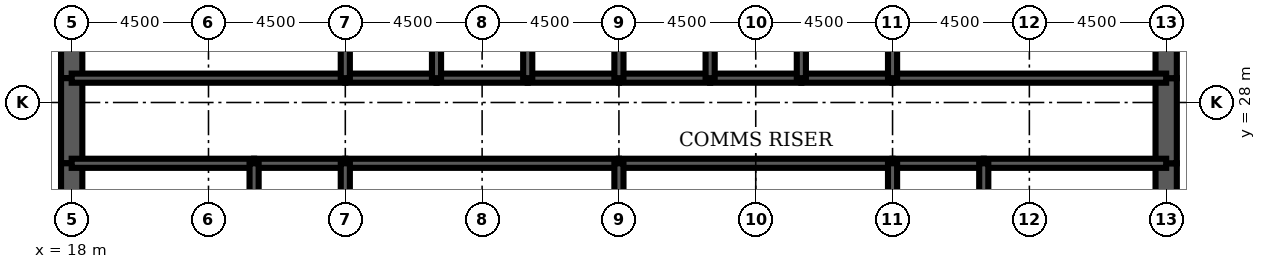
"""IFC4 building model, lengths in metres.
Left out: names, types, materials, properties, quantities, classifications, styles, units other than length and angle.
Written with IfcOpenShell. Run it as: python <this file> out.ifc"""

import sys

from ifc_helpers import new_model, si_unit, direction, frame, frame_2d, origin, place, context, subcontext, project, spatial, rectangle, extrude, element, fill, save


model = new_model("IFC4")
c1 = context("Model", 3, precision=1e-05, world=origin(), true_north=direction((0.0, 1.0)))
c2 = subcontext(c1, "Body", "Model", "MODEL_VIEW")
j1 = project(units=[si_unit("LENGTHUNIT", "METRE"), si_unit("PLANEANGLEUNIT", "RADIAN")], contexts=[c1])
p1 = place(None, origin())
s1 = spatial("IfcSite", under=j1, at=p1, CompositionType="ELEMENT")
p2 = place(p1, origin())
s2 = spatial("IfcBuilding", under=s1, at=p2, CompositionType="ELEMENT")
p3 = place(p2, frame((0.0, 0.0, 271.1)))
s3 = spatial("IfcBuildingStorey", under=s2, at=p3, CompositionType="ELEMENT", Elevation=271.1)
p4 = place(p3, frame((18.0, 32.0, 0.0), z_axis=(0.0, 0.0, 1.0), x_axis=(0.0, -1.0, 0.0)))
e1 = element("IfcWall", 1, at=p4, inside=s3, PredefinedType="SHEAR", context=c2, shape_type="SweptSolid", body=[
    extrude(rectangle(XDim=3.2, YDim=0.7, at=frame_2d((1.6, 0.0))), origin(), (0.0, 0.0, 1.0), 4.2),
])
p5 = place(p3, frame((18.0, 28.8, 0.0), z_axis=(0.0, 0.0, 1.0), x_axis=(0.0, -1.0, 0.0)))
e2 = element("IfcWall", 2, at=p5, inside=s3, PredefinedType="SHEAR", context=c2, shape_type="SweptSolid", body=[
    extrude(rectangle(XDim=2.8, YDim=0.7, at=frame_2d((1.4, 0.0))), origin(), (0.0, 0.0, 1.0), 4.2),
])
p6 = place(p5, frame((0.4, 0.0, 0.0)))
e3 = element("IfcOpeningElement", 3, at=p6, cuts=e2, PredefinedType="OPENING", context=c2, shape_type="SweptSolid", body=[
    extrude(rectangle(XDim=1.8, YDim=2.1, at=frame_2d((0.9, 1.05))), frame((0.0, 0.36, 0.0), z_axis=(0.0, -1.0, 0.0), x_axis=(1.0, 0.0, 0.0)), (0.0, 0.0, 1.0), 0.72),
])
for number, where, z_axis, x_axis in (
    (4, (18.0, 26.0, 0.0), (0.0, 0.0, 1.0), (0.0, -1.0, 0.0)),
    (5, (54.0, 22.0, 0.0), (0.0, 0.0, 1.0), (0.0, 1.0, 0.0)),
):
    element("IfcWall", number, at=place(p3, frame(where, z_axis=z_axis, x_axis=x_axis)), inside=s3, PredefinedType="SHEAR", context=c2, shape_type="SweptSolid", body=[
        extrude(rectangle(XDim=4.0, YDim=0.7, at=frame_2d((2.0, 0.0))), origin(), (0.0, 0.0, 1.0), 4.2),
    ])
p7 = place(p3, frame((54.0, 26.0, 0.0), z_axis=(0.0, 0.0, 1.0), x_axis=(0.0, 1.0, 0.0)))
e6 = element("IfcWall", 6, at=p7, inside=s3, PredefinedType="SHEAR", context=c2, shape_type="SweptSolid", body=[
    extrude(rectangle(XDim=2.8, YDim=0.7, at=frame_2d((1.4, 0.0))), origin(), (0.0, 0.0, 1.0), 4.2),
])
p8 = place(p7, frame((0.6, 0.0, 0.0)))
e7 = element("IfcOpeningElement", 7, at=p8, cuts=e6, PredefinedType="OPENING", context=c2, shape_type="SweptSolid", body=[
    extrude(rectangle(XDim=1.8, YDim=2.1, at=frame_2d((0.9, 1.05))), frame((0.0, 0.36, 0.0), z_axis=(0.0, -1.0, 0.0), x_axis=(1.0, 0.0, 0.0)), (0.0, 0.0, 1.0), 0.72),
])
p9 = place(p3, frame((54.0, 28.8, 0.0), z_axis=(0.0, 0.0, 1.0), x_axis=(0.0, 1.0, 0.0)))
e8 = element("IfcWall", 8, at=p9, inside=s3, PredefinedType="SHEAR", context=c2, shape_type="SweptSolid", body=[
    extrude(rectangle(XDim=3.2, YDim=0.7, at=frame_2d((1.6, 0.0))), origin(), (0.0, 0.0, 1.0), 4.2),
])
p10 = place(p3, frame((18.0, 28.8, 0.0), z_axis=(0.0, 0.0, 1.0), x_axis=(1.0, 0.0, 0.0)))
e9 = element("IfcWall", 9, at=p10, inside=s3, PredefinedType="SOLIDWALL", context=c2, shape_type="SweptSolid", body=[
    extrude(rectangle(XDim=9.0, YDim=0.3, at=frame_2d((4.5, 0.0))), origin(), (0.0, 0.0, 1.0), 4.2),
])
p11 = place(p10, frame((0.65, 0.0, 0.0)))
e10 = element("IfcOpeningElement", 10, at=p11, cuts=e9, PredefinedType="OPENING", context=c2, shape_type="SweptSolid", body=[
    extrude(rectangle(XDim=1.0, YDim=2.1, at=frame_2d((0.5, 1.05))), frame((0.0, 0.16, 0.0), z_axis=(0.0, -1.0, 0.0), x_axis=(1.0, 0.0, 0.0)), (0.0, 0.0, 1.0), 0.32),
])
p12 = place(p3, frame((27.0, 28.8, 0.0), z_axis=(0.0, 0.0, 1.0), x_axis=(1.0, 0.0, 0.0)))
e11 = element("IfcWall", 11, at=p12, inside=s3, PredefinedType="SOLIDWALL", context=c2, shape_type="SweptSolid", body=[
    extrude(rectangle(XDim=3.0, YDim=0.3, at=frame_2d((1.5, 0.0))), origin(), (0.0, 0.0, 1.0), 4.2),
])
p13 = place(p12, frame((0.95, 0.0, 0.0)))
e12 = element("IfcOpeningElement", 12, at=p13, cuts=e11, PredefinedType="OPENING", context=c2, shape_type="SweptSolid", body=[
    extrude(rectangle(XDim=1.1, YDim=2.2, at=frame_2d((0.55, 1.1))), frame((0.0, 0.16, 0.0), z_axis=(0.0, -1.0, 0.0), x_axis=(1.0, 0.0, 0.0)), (0.0, 0.0, 1.0), 0.32),
])
p14 = place(p3, frame((30.0, 28.8, 0.0), z_axis=(0.0, 0.0, 1.0), x_axis=(1.0, 0.0, 0.0)))
e13 = element("IfcWall", 13, at=p14, inside=s3, PredefinedType="SOLIDWALL", context=c2, shape_type="SweptSolid", body=[
    extrude(rectangle(XDim=3.0, YDim=0.3, at=frame_2d((1.5, 0.0))), origin(), (0.0, 0.0, 1.0), 4.2),
])
p15 = place(p14, frame((0.95, 0.0, 0.0)))
e14 = element("IfcOpeningElement", 14, at=p15, cuts=e13, PredefinedType="OPENING", context=c2, shape_type="SweptSolid", body=[
    extrude(rectangle(XDim=1.1, YDim=2.2, at=frame_2d((0.55, 1.1))), frame((0.0, 0.16, 0.0), z_axis=(0.0, -1.0, 0.0), x_axis=(1.0, 0.0, 0.0)), (0.0, 0.0, 1.0), 0.32),
])
p16 = place(p3, frame((33.0, 28.8, 0.0), z_axis=(0.0, 0.0, 1.0), x_axis=(1.0, 0.0, 0.0)))
e15 = element("IfcWall", 15, at=p16, inside=s3, PredefinedType="SOLIDWALL", context=c2, shape_type="SweptSolid", body=[
    extrude(rectangle(XDim=3.0, YDim=0.3, at=frame_2d((1.5, 0.0))), origin(), (0.0, 0.0, 1.0), 4.2),
])
p17 = place(p16, frame((0.95, 0.0, 0.0)))
e16 = element("IfcOpeningElement", 16, at=p17, cuts=e15, PredefinedType="OPENING", context=c2, shape_type="SweptSolid", body=[
    extrude(rectangle(XDim=1.1, YDim=2.2, at=frame_2d((0.55, 1.1))), frame((0.0, 0.16, 0.0), z_axis=(0.0, -1.0, 0.0), x_axis=(1.0, 0.0, 0.0)), (0.0, 0.0, 1.0), 0.32),
])
p18 = place(p3, frame((36.0, 28.8, 0.0), z_axis=(0.0, 0.0, 1.0), x_axis=(1.0, 0.0, 0.0)))
e17 = element("IfcWall", 17, at=p18, inside=s3, PredefinedType="SOLIDWALL", context=c2, shape_type="SweptSolid", body=[
    extrude(rectangle(XDim=3.0, YDim=0.3, at=frame_2d((1.5, 0.0))), origin(), (0.0, 0.0, 1.0), 4.2),
])
p19 = place(p18, frame((0.95, 0.0, 0.0)))
e18 = element("IfcOpeningElement", 18, at=p19, cuts=e17, PredefinedType="OPENING", context=c2, shape_type="SweptSolid", body=[
    extrude(rectangle(XDim=1.1, YDim=2.2, at=frame_2d((0.55, 1.1))), frame((0.0, 0.16, 0.0), z_axis=(0.0, -1.0, 0.0), x_axis=(1.0, 0.0, 0.0)), (0.0, 0.0, 1.0), 0.32),
])
p20 = place(p3, frame((39.0, 28.8, 0.0), z_axis=(0.0, 0.0, 1.0), x_axis=(1.0, 0.0, 0.0)))
e19 = element("IfcWall", 19, at=p20, inside=s3, PredefinedType="SOLIDWALL", context=c2, shape_type="SweptSolid", body=[
    extrude(rectangle(XDim=3.0, YDim=0.3, at=frame_2d((1.5, 0.0))), origin(), (0.0, 0.0, 1.0), 4.2),
])
p21 = place(p20, frame((0.95, 0.0, 0.0)))
e20 = element("IfcOpeningElement", 20, at=p21, cuts=e19, PredefinedType="OPENING", context=c2, shape_type="SweptSolid", body=[
    extrude(rectangle(XDim=1.1, YDim=2.2, at=frame_2d((0.55, 1.1))), frame((0.0, 0.16, 0.0), z_axis=(0.0, -1.0, 0.0), x_axis=(1.0, 0.0, 0.0)), (0.0, 0.0, 1.0), 0.32),
])
p22 = place(p3, frame((42.0, 28.8, 0.0), z_axis=(0.0, 0.0, 1.0), x_axis=(1.0, 0.0, 0.0)))
e21 = element("IfcWall", 21, at=p22, inside=s3, PredefinedType="SOLIDWALL", context=c2, shape_type="SweptSolid", body=[
    extrude(rectangle(XDim=3.0, YDim=0.3, at=frame_2d((1.5, 0.0))), origin(), (0.0, 0.0, 1.0), 4.2),
])
p23 = place(p22, frame((0.95, 0.0, 0.0)))
e22 = element("IfcOpeningElement", 22, at=p23, cuts=e21, PredefinedType="OPENING", context=c2, shape_type="SweptSolid", body=[
    extrude(rectangle(XDim=1.1, YDim=2.2, at=frame_2d((0.55, 1.1))), frame((0.0, 0.16, 0.0), z_axis=(0.0, -1.0, 0.0), x_axis=(1.0, 0.0, 0.0)), (0.0, 0.0, 1.0), 0.32),
])
p24 = place(p3, frame((45.0, 28.8, 0.0), z_axis=(0.0, 0.0, 1.0), x_axis=(1.0, 0.0, 0.0)))
e23 = element("IfcWall", 23, at=p24, inside=s3, PredefinedType="SOLIDWALL", context=c2, shape_type="SweptSolid", body=[
    extrude(rectangle(XDim=9.0, YDim=0.3, at=frame_2d((4.5, 0.0))), origin(), (0.0, 0.0, 1.0), 4.2),
])
p25 = place(p24, frame((7.35, 0.0, 0.0)))
e24 = element("IfcOpeningElement", 24, at=p25, cuts=e23, PredefinedType="OPENING", context=c2, shape_type="SweptSolid", body=[
    extrude(rectangle(XDim=1.0, YDim=2.1, at=frame_2d((0.5, 1.05))), frame((0.0, 0.16, 0.0), z_axis=(0.0, -1.0, 0.0), x_axis=(1.0, 0.0, 0.0)), (0.0, 0.0, 1.0), 0.32),
])
p26 = place(p3, frame((18.0, 26.0, 0.0), z_axis=(0.0, 0.0, 1.0), x_axis=(1.0, 0.0, 0.0)))
e25 = element("IfcWall", 25, at=p26, inside=s3, PredefinedType="SOLIDWALL", context=c2, shape_type="SweptSolid", body=[
    extrude(rectangle(XDim=6.0, YDim=0.3, at=frame_2d((3.0, 0.0))), origin(), (0.0, 0.0, 1.0), 4.2),
])
p27 = place(p3, frame((24.0, 26.0, 0.0), z_axis=(0.0, 0.0, 1.0), x_axis=(1.0, 0.0, 0.0)))
e26 = element("IfcWall", 26, at=p27, inside=s3, PredefinedType="SOLIDWALL", context=c2, shape_type="SweptSolid", body=[
    extrude(rectangle(XDim=3.0, YDim=0.3, at=frame_2d((1.5, 0.0))), origin(), (0.0, 0.0, 1.0), 4.2),
])
for number, where, z_axis, x_axis in (
    (27, (27.0, 26.0, 0.0), (0.0, 0.0, 1.0), (1.0, 0.0, 0.0)),
    (28, (36.0, 26.0, 0.0), (0.0, 0.0, 1.0), (1.0, 0.0, 0.0)),
):
    element("IfcWall", number, at=place(p3, frame(where, z_axis=z_axis, x_axis=x_axis)), inside=s3, PredefinedType="SOLIDWALL", context=c2, shape_type="SweptSolid", body=[
        extrude(rectangle(XDim=9.0, YDim=0.3, at=frame_2d((4.5, 0.0))), origin(), (0.0, 0.0, 1.0), 4.2),
    ])
p28 = place(p3, frame((45.0, 26.0, 0.0), z_axis=(0.0, 0.0, 1.0), x_axis=(1.0, 0.0, 0.0)))
e29 = element("IfcWall", 29, at=p28, inside=s3, PredefinedType="SOLIDWALL", context=c2, shape_type="SweptSolid", body=[
    extrude(rectangle(XDim=3.0, YDim=0.3, at=frame_2d((1.5, 0.0))), origin(), (0.0, 0.0, 1.0), 4.2),
])
p29 = place(p3, frame((48.0, 26.0, 0.0), z_axis=(0.0, 0.0, 1.0), x_axis=(1.0, 0.0, 0.0)))
e30 = element("IfcWall", 30, at=p29, inside=s3, PredefinedType="SOLIDWALL", context=c2, shape_type="SweptSolid", body=[
    extrude(rectangle(XDim=6.0, YDim=0.3, at=frame_2d((3.0, 0.0))), origin(), (0.0, 0.0, 1.0), 4.2),
])
for number, where, z_axis, x_axis in (
    (31, (27.0, 28.8, 0.0), (0.0, 0.0, 1.0), (0.0, 1.0, 0.0)),
    (32, (30.0, 28.8, 0.0), (0.0, 0.0, 1.0), (0.0, 1.0, 0.0)),
    (33, (33.0, 28.8, 0.0), (0.0, 0.0, 1.0), (0.0, 1.0, 0.0)),
    (34, (36.0, 28.8, 0.0), (0.0, 0.0, 1.0), (0.0, 1.0, 0.0)),
    (35, (39.0, 28.8, 0.0), (0.0, 0.0, 1.0), (0.0, 1.0, 0.0)),
    (36, (42.0, 28.8, 0.0), (0.0, 0.0, 1.0), (0.0, 1.0, 0.0)),
    (37, (45.0, 28.8, 0.0), (0.0, 0.0, 1.0), (0.0, 1.0, 0.0)),
):
    element("IfcWall", number, at=place(p3, frame(where, z_axis=z_axis, x_axis=x_axis)), inside=s3, PredefinedType="SOLIDWALL", context=c2, shape_type="SweptSolid", body=[
        extrude(rectangle(XDim=3.2, YDim=0.3, at=frame_2d((1.6, 0.0))), origin(), (0.0, 0.0, 1.0), 4.2),
    ])
for number, where, z_axis, x_axis in (
    (38, (24.0, 22.0, 0.0), (0.0, 0.0, 1.0), (0.0, 1.0, 0.0)),
    (39, (27.0, 22.0, 0.0), (0.0, 0.0, 1.0), (0.0, 1.0, 0.0)),
    (40, (36.0, 22.0, 0.0), (0.0, 0.0, 1.0), (0.0, 1.0, 0.0)),
    (41, (45.0, 22.0, 0.0), (0.0, 0.0, 1.0), (0.0, 1.0, 0.0)),
    (42, (48.0, 22.0, 0.0), (0.0, 0.0, 1.0), (0.0, 1.0, 0.0)),
):
    element("IfcWall", number, at=place(p3, frame(where, z_axis=z_axis, x_axis=x_axis)), inside=s3, PredefinedType="SOLIDWALL", context=c2, shape_type="SweptSolid", body=[
        extrude(rectangle(XDim=4.0, YDim=0.3, at=frame_2d((2.0, 0.0))), origin(), (0.0, 0.0, 1.0), 4.2),
    ])
p30 = place(p3, frame((38.5, 22.15, 0.0), z_axis=(0.0, 0.0, 1.0), x_axis=(0.0, 1.0, 0.0)))
e43 = element("IfcWall", 43, at=p30, inside=s3, PredefinedType="PARTITIONING", context=c2, shape_type="SweptSolid", body=[
    extrude(rectangle(XDim=3.7, YDim=0.15, at=frame_2d((1.85, 0.0))), origin(), (0.0, 0.0, 1.0), 3.0),
])
p31 = place(p30, frame((2.2, 0.0, 0.0)))
e44 = element("IfcOpeningElement", 44, at=p31, cuts=e43, PredefinedType="OPENING", context=c2, shape_type="SweptSolid", body=[
    extrude(rectangle(XDim=1.0, YDim=2.1, at=frame_2d((0.5, 1.05))), frame((0.0, 0.085, 0.0), z_axis=(0.0, -1.0, 0.0), x_axis=(1.0, 0.0, 0.0)), (0.0, 0.0, 1.0), 0.17),
])
p32 = place(p3, frame((52.075, 22.15, 0.0), z_axis=(0.0, 0.0, 1.0), x_axis=(0.0, 1.0, 0.0)))
e45 = element("IfcWall", 45, at=p32, inside=s3, PredefinedType="PARTITIONING", context=c2, shape_type="SweptSolid", body=[
    extrude(rectangle(XDim=3.7, YDim=0.15, at=frame_2d((1.85, 0.0))), origin(), (0.0, 0.0, 1.0), 3.0),
])
p33 = place(p31, origin())
e46 = element("IfcDoor", 46, at=p33, inside=s3, OperationType="SINGLE_SWING_RIGHT", PredefinedType="DOOR", context=c2, shape_type="SweptSolid", body=[
    extrude(rectangle(XDim=1.0, YDim=2.1, at=frame_2d((0.5, 1.05))), frame((0.0, 0.025, 0.0), z_axis=(0.0, -1.0, 0.0), x_axis=(1.0, 0.0, 0.0)), (0.0, 0.0, 1.0), 0.05),
])
fill(e44, e46)
p34 = place(p23, origin())
e47 = element("IfcDoor", 47, at=p34, inside=s3, OperationType="DOUBLE_DOOR_SLIDING", PredefinedType="USERDEFINED", context=c2, shape_type="SweptSolid", body=[
    extrude(rectangle(XDim=1.1, YDim=2.2, at=frame_2d((0.55, 1.1))), frame((0.0, 0.025, 0.0), z_axis=(0.0, -1.0, 0.0), x_axis=(1.0, 0.0, 0.0)), (0.0, 0.0, 1.0), 0.05),
])
fill(e22, e47)
p35 = place(p13, origin())
e48 = element("IfcDoor", 48, at=p35, inside=s3, OperationType="DOUBLE_DOOR_SLIDING", PredefinedType="USERDEFINED", context=c2, shape_type="SweptSolid", body=[
    extrude(rectangle(XDim=1.1, YDim=2.2, at=frame_2d((0.55, 1.1))), frame((0.0, 0.025, 0.0), z_axis=(0.0, -1.0, 0.0), x_axis=(1.0, 0.0, 0.0)), (0.0, 0.0, 1.0), 0.05),
])
fill(e12, e48)
p36 = place(p19, origin())
e49 = element("IfcDoor", 49, at=p36, inside=s3, OperationType="DOUBLE_DOOR_SLIDING", PredefinedType="USERDEFINED", context=c2, shape_type="SweptSolid", body=[
    extrude(rectangle(XDim=1.1, YDim=2.2, at=frame_2d((0.55, 1.1))), frame((0.0, 0.025, 0.0), z_axis=(0.0, -1.0, 0.0), x_axis=(1.0, 0.0, 0.0)), (0.0, 0.0, 1.0), 0.05),
])
fill(e18, e49)
p37 = place(p21, origin())
e50 = element("IfcDoor", 50, at=p37, inside=s3, OperationType="DOUBLE_DOOR_SLIDING", PredefinedType="USERDEFINED", context=c2, shape_type="SweptSolid", body=[
    extrude(rectangle(XDim=1.1, YDim=2.2, at=frame_2d((0.55, 1.1))), frame((0.0, 0.025, 0.0), z_axis=(0.0, -1.0, 0.0), x_axis=(1.0, 0.0, 0.0)), (0.0, 0.0, 1.0), 0.05),
])
fill(e20, e50)
p38 = place(p15, origin())
e51 = element("IfcDoor", 51, at=p38, inside=s3, OperationType="DOUBLE_DOOR_SLIDING", PredefinedType="USERDEFINED", context=c2, shape_type="SweptSolid", body=[
    extrude(rectangle(XDim=1.1, YDim=2.2, at=frame_2d((0.55, 1.1))), frame((0.0, 0.025, 0.0), z_axis=(0.0, -1.0, 0.0), x_axis=(1.0, 0.0, 0.0)), (0.0, 0.0, 1.0), 0.05),
])
fill(e14, e51)
p39 = place(p17, origin())
e52 = element("IfcDoor", 52, at=p39, inside=s3, OperationType="DOUBLE_DOOR_SLIDING", PredefinedType="USERDEFINED", context=c2, shape_type="SweptSolid", body=[
    extrude(rectangle(XDim=1.1, YDim=2.2, at=frame_2d((0.55, 1.1))), frame((0.0, 0.025, 0.0), z_axis=(0.0, -1.0, 0.0), x_axis=(1.0, 0.0, 0.0)), (0.0, 0.0, 1.0), 0.05),
])
fill(e16, e52)
p40 = place(p11, origin())
e53 = element("IfcDoor", 53, at=p40, inside=s3, OperationType="SINGLE_SWING_LEFT", PredefinedType="DOOR", context=c2, shape_type="SweptSolid", body=[
    extrude(rectangle(XDim=1.0, YDim=2.1, at=frame_2d((0.5, 1.05))), frame((0.0, 0.025, 0.0), z_axis=(0.0, -1.0, 0.0), x_axis=(1.0, 0.0, 0.0)), (0.0, 0.0, 1.0), 0.05),
])
fill(e10, e53)
p41 = place(p25, origin())
e54 = element("IfcDoor", 54, at=p41, inside=s3, OperationType="SINGLE_SWING_RIGHT", PredefinedType="DOOR", context=c2, shape_type="SweptSolid", body=[
    extrude(rectangle(XDim=1.0, YDim=2.1, at=frame_2d((0.5, 1.05))), frame((0.0, 0.025, 0.0), z_axis=(0.0, -1.0, 0.0), x_axis=(1.0, 0.0, 0.0)), (0.0, 0.0, 1.0), 0.05),
])
fill(e24, e54)
p42 = place(p6, origin())
e55 = element("IfcDoor", 55, at=p42, inside=s3, OperationType="SINGLE_SWING_LEFT", PredefinedType="DOOR", context=c2, shape_type="SweptSolid", body=[
    extrude(rectangle(XDim=1.8, YDim=2.1, at=frame_2d((0.9, 1.05))), frame((0.0, 0.35, 0.0), z_axis=(0.0, -1.0, 0.0), x_axis=(1.0, 0.0, 0.0)), (0.0, 0.0, 1.0), 0.699),
])
fill(e3, e55)
p43 = place(p8, origin())
e56 = element("IfcDoor", 56, at=p43, inside=s3, OperationType="SINGLE_SWING_LEFT", PredefinedType="DOOR", context=c2, shape_type="SweptSolid", body=[
    extrude(rectangle(XDim=1.8, YDim=2.1, at=frame_2d((0.9, 1.05))), frame((0.0, 0.35, 0.0), z_axis=(0.0, -1.0, 0.0), x_axis=(1.0, 0.0, 0.0)), (0.0, 0.0, 1.0), 0.699),
])
fill(e7, e56)
save(model, sys.argv[1])
